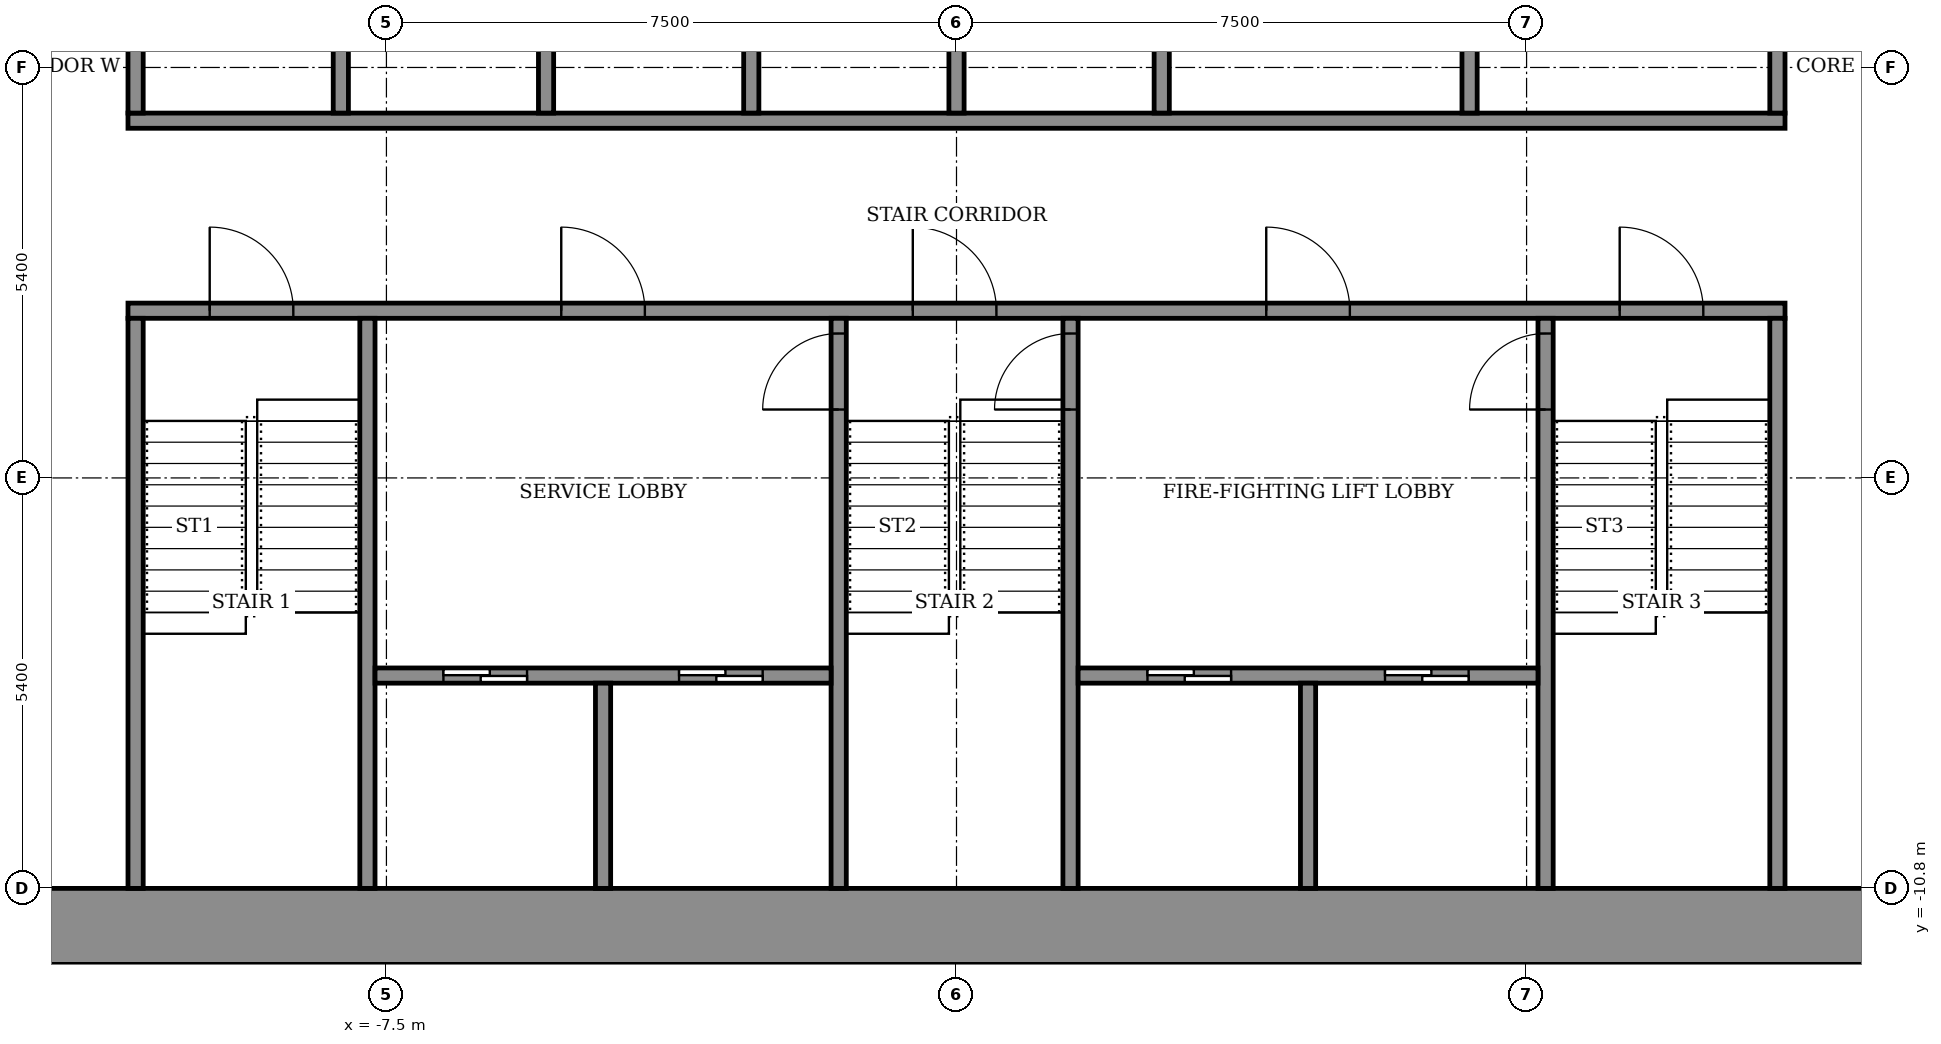
"""IFC4 building model, lengths in metres.
Left out: names, types, materials, properties, quantities, classifications, styles, units other than length and angle.
Written with IfcOpenShell. Run it as: python <this file> out.ifc"""

import sys

from ifc_helpers import new_model, si_unit, direction, frame, frame_2d, origin, place, context, subcontext, project, spatial, rectangle, extrude, element, fill, save


model = new_model("IFC4")
c1 = context("Model", 3, precision=1e-05, world=origin(), true_north=direction((0.0, 1.0)))
c2 = subcontext(c1, "Body", "Model", "MODEL_VIEW")
j1 = project(units=[si_unit("LENGTHUNIT", "METRE"), si_unit("PLANEANGLEUNIT", "RADIAN")], contexts=[c1])
p1 = place(None, origin())
s1 = spatial("IfcSite", under=j1, at=p1, CompositionType="ELEMENT")
p2 = place(p1, origin())
s2 = spatial("IfcBuilding", under=s1, at=p2, CompositionType="ELEMENT")
p3 = place(p2, frame((0.0, 0.0, 93.7)))
s3 = spatial("IfcBuildingStorey", under=s2, at=p3, CompositionType="ELEMENT", Elevation=93.7)
p4 = place(p3, frame((-14.8, -11.3, 0.0), z_axis=(0.0, 0.0, 1.0), x_axis=(1.0, 0.0, 0.0)))
e1 = element("IfcWall", 1, at=p4, inside=s3, PredefinedType="SHEAR", context=c2, shape_type="SweptSolid", body=[
    extrude(rectangle(XDim=29.6, YDim=1.0, at=frame_2d((14.8, 0.0))), origin(), (0.0, 0.0, 1.0), 3.6),
])
p5 = place(p3, frame((-10.9, -3.2, 0.0), z_axis=(0.0, 0.0, 1.0), x_axis=(1.0, 0.0, 0.0)))
e2 = element("IfcWall", 2, at=p5, inside=s3, PredefinedType="SHEAR", context=c2, shape_type="SweptSolid", body=[
    extrude(rectangle(XDim=21.8, YDim=0.2, at=frame_2d((10.9, 0.0))), origin(), (0.0, 0.0, 1.0), 3.05),
])
p6 = place(p5, frame((1.075, 0.0, 0.0)))
e3 = element("IfcOpeningElement", 3, at=p6, cuts=e2, PredefinedType="OPENING", context=c2, shape_type="SweptSolid", body=[
    extrude(rectangle(XDim=1.1, YDim=2.1, at=frame_2d((0.55, 1.05))), frame((0.0, 0.11, 0.0), z_axis=(0.0, -1.0, 0.0), x_axis=(1.0, 0.0, 0.0)), (0.0, 0.0, 1.0), 0.22),
])
p7 = place(p5, frame((10.325, 0.0, 0.0)))
e4 = element("IfcOpeningElement", 4, at=p7, cuts=e2, PredefinedType="OPENING", context=c2, shape_type="SweptSolid", body=[
    extrude(rectangle(XDim=1.1, YDim=2.1, at=frame_2d((0.55, 1.05))), frame((0.0, 0.11, 0.0), z_axis=(0.0, -1.0, 0.0), x_axis=(1.0, 0.0, 0.0)), (0.0, 0.0, 1.0), 0.22),
])
p8 = place(p5, frame((19.625, 0.0, 0.0)))
e5 = element("IfcOpeningElement", 5, at=p8, cuts=e2, PredefinedType="OPENING", context=c2, shape_type="SweptSolid", body=[
    extrude(rectangle(XDim=1.1, YDim=2.1, at=frame_2d((0.55, 1.05))), frame((0.0, 0.11, 0.0), z_axis=(0.0, -1.0, 0.0), x_axis=(1.0, 0.0, 0.0)), (0.0, 0.0, 1.0), 0.22),
])
p9 = place(p5, frame((5.7, 0.0, 0.0)))
e6 = element("IfcOpeningElement", 6, at=p9, cuts=e2, PredefinedType="OPENING", context=c2, shape_type="SweptSolid", body=[
    extrude(rectangle(XDim=1.1, YDim=2.1, at=frame_2d((0.55, 1.05))), frame((0.0, 0.11, 0.0), z_axis=(0.0, -1.0, 0.0), x_axis=(1.0, 0.0, 0.0)), (0.0, 0.0, 1.0), 0.22),
])
p10 = place(p5, frame((14.975, 0.0, 0.0)))
e7 = element("IfcOpeningElement", 7, at=p10, cuts=e2, PredefinedType="OPENING", context=c2, shape_type="SweptSolid", body=[
    extrude(rectangle(XDim=1.1, YDim=2.1, at=frame_2d((0.55, 1.05))), frame((0.0, 0.11, 0.0), z_axis=(0.0, -1.0, 0.0), x_axis=(1.0, 0.0, 0.0)), (0.0, 0.0, 1.0), 0.22),
])
p11 = place(p3, frame((-10.9, -0.7, 0.0), z_axis=(0.0, 0.0, 1.0), x_axis=(1.0, 0.0, 0.0)))
e8 = element("IfcWall", 8, at=p11, inside=s3, PredefinedType="SHEAR", context=c2, shape_type="SweptSolid", body=[
    extrude(rectangle(XDim=21.8, YDim=0.2, at=frame_2d((10.9, 0.0))), origin(), (0.0, 0.0, 1.0), 3.05),
])
for number, where, z_axis, x_axis in (
    (9, (-10.8, -10.8, 0.0), (0.0, 0.0, 1.0), (0.0, 1.0, 0.0)),
    (10, (-7.75, -10.8, 0.0), (0.0, 0.0, 1.0), (0.0, 1.0, 0.0)),
):
    element("IfcWall", number, at=place(p3, frame(where, z_axis=z_axis, x_axis=x_axis)), inside=s3, PredefinedType="SHEAR", context=c2, shape_type="SweptSolid", body=[
        extrude(rectangle(XDim=7.5, YDim=0.2, at=frame_2d((3.75, 0.0))), origin(), (0.0, 0.0, 1.0), 3.05),
    ])
p12 = place(p3, frame((-1.55, -10.8, 0.0), z_axis=(0.0, 0.0, 1.0), x_axis=(0.0, 1.0, 0.0)))
e11 = element("IfcWall", 11, at=p12, inside=s3, PredefinedType="SHEAR", context=c2, shape_type="SweptSolid", body=[
    extrude(rectangle(XDim=7.5, YDim=0.2, at=frame_2d((3.75, 0.0))), origin(), (0.0, 0.0, 1.0), 3.05),
])
p13 = place(p12, frame((6.3, 0.0, 0.0)))
e12 = element("IfcOpeningElement", 12, at=p13, cuts=e11, PredefinedType="OPENING", context=c2, shape_type="SweptSolid", body=[
    extrude(rectangle(XDim=1.0, YDim=2.1, at=frame_2d((0.5, 1.05))), frame((0.0, 0.11, 0.0), z_axis=(0.0, -1.0, 0.0), x_axis=(1.0, 0.0, 0.0)), (0.0, 0.0, 1.0), 0.22),
])
p14 = place(p3, frame((1.5, -10.8, 0.0), z_axis=(0.0, 0.0, 1.0), x_axis=(0.0, 1.0, 0.0)))
e13 = element("IfcWall", 13, at=p14, inside=s3, PredefinedType="SHEAR", context=c2, shape_type="SweptSolid", body=[
    extrude(rectangle(XDim=7.5, YDim=0.2, at=frame_2d((3.75, 0.0))), origin(), (0.0, 0.0, 1.0), 3.05),
])
p15 = place(p14, frame((6.3, 0.0, 0.0)))
e14 = element("IfcOpeningElement", 14, at=p15, cuts=e13, PredefinedType="OPENING", context=c2, shape_type="SweptSolid", body=[
    extrude(rectangle(XDim=1.0, YDim=2.1, at=frame_2d((0.5, 1.05))), frame((0.0, 0.11, 0.0), z_axis=(0.0, -1.0, 0.0), x_axis=(1.0, 0.0, 0.0)), (0.0, 0.0, 1.0), 0.22),
])
p16 = place(p3, frame((7.75, -10.8, 0.0), z_axis=(0.0, 0.0, 1.0), x_axis=(0.0, 1.0, 0.0)))
e15 = element("IfcWall", 15, at=p16, inside=s3, PredefinedType="SHEAR", context=c2, shape_type="SweptSolid", body=[
    extrude(rectangle(XDim=7.5, YDim=0.2, at=frame_2d((3.75, 0.0))), origin(), (0.0, 0.0, 1.0), 3.05),
])
p17 = place(p16, frame((6.3, 0.0, 0.0)))
e16 = element("IfcOpeningElement", 16, at=p17, cuts=e15, PredefinedType="OPENING", context=c2, shape_type="SweptSolid", body=[
    extrude(rectangle(XDim=1.0, YDim=2.1, at=frame_2d((0.5, 1.05))), frame((0.0, 0.11, 0.0), z_axis=(0.0, -1.0, 0.0), x_axis=(1.0, 0.0, 0.0)), (0.0, 0.0, 1.0), 0.22),
])
p18 = place(p3, frame((10.8, -10.8, 0.0), z_axis=(0.0, 0.0, 1.0), x_axis=(0.0, 1.0, 0.0)))
e17 = element("IfcWall", 17, at=p18, inside=s3, PredefinedType="SHEAR", context=c2, shape_type="SweptSolid", body=[
    extrude(rectangle(XDim=7.5, YDim=0.2, at=frame_2d((3.75, 0.0))), origin(), (0.0, 0.0, 1.0), 3.05),
])
p19 = place(p3, frame((-7.65, -8.0, 0.0), z_axis=(0.0, 0.0, 1.0), x_axis=(1.0, 0.0, 0.0)))
e18 = element("IfcWall", 18, at=p19, inside=s3, PredefinedType="SHEAR", context=c2, shape_type="SweptSolid", body=[
    extrude(rectangle(XDim=6.0, YDim=0.2, at=frame_2d((3.0, 0.0))), origin(), (0.0, 0.0, 1.0), 3.05),
])
p20 = place(p19, frame((0.9, 0.0, 0.0)))
e19 = element("IfcOpeningElement", 19, at=p20, cuts=e18, PredefinedType="OPENING", context=c2, shape_type="SweptSolid", body=[
    extrude(rectangle(XDim=1.1, YDim=2.1, at=frame_2d((0.55, 1.05))), frame((0.0, 0.11, 0.0), z_axis=(0.0, -1.0, 0.0), x_axis=(1.0, 0.0, 0.0)), (0.0, 0.0, 1.0), 0.22),
])
p21 = place(p19, frame((4.0, 0.0, 0.0)))
e20 = element("IfcOpeningElement", 20, at=p21, cuts=e18, PredefinedType="OPENING", context=c2, shape_type="SweptSolid", body=[
    extrude(rectangle(XDim=1.1, YDim=2.1, at=frame_2d((0.55, 1.05))), frame((0.0, 0.11, 0.0), z_axis=(0.0, -1.0, 0.0), x_axis=(1.0, 0.0, 0.0)), (0.0, 0.0, 1.0), 0.22),
])
p22 = place(p3, frame((-4.65, -10.8, 0.0), z_axis=(0.0, 0.0, 1.0), x_axis=(0.0, 1.0, 0.0)))
e21 = element("IfcWall", 21, at=p22, inside=s3, PredefinedType="SHEAR", context=c2, shape_type="SweptSolid", body=[
    extrude(rectangle(XDim=2.7, YDim=0.2, at=frame_2d((1.35, 0.0))), origin(), (0.0, 0.0, 1.0), 3.05),
])
p23 = place(p3, frame((1.6, -8.0, 0.0), z_axis=(0.0, 0.0, 1.0), x_axis=(1.0, 0.0, 0.0)))
e22 = element("IfcWall", 22, at=p23, inside=s3, PredefinedType="SHEAR", context=c2, shape_type="SweptSolid", body=[
    extrude(rectangle(XDim=6.05, YDim=0.2, at=frame_2d((3.025, 0.0))), origin(), (0.0, 0.0, 1.0), 3.05),
])
p24 = place(p23, frame((0.913, 0.0, 0.0)))
e23 = element("IfcOpeningElement", 23, at=p24, cuts=e22, PredefinedType="OPENING", context=c2, shape_type="SweptSolid", body=[
    extrude(rectangle(XDim=1.1, YDim=2.1, at=frame_2d((0.55, 1.05))), frame((0.0, 0.11, 0.0), z_axis=(0.0, -1.0, 0.0), x_axis=(1.0, 0.0, 0.0)), (0.0, 0.0, 1.0), 0.22),
])
p25 = place(p23, frame((4.038, 0.0, 0.0)))
e24 = element("IfcOpeningElement", 24, at=p25, cuts=e22, PredefinedType="OPENING", context=c2, shape_type="SweptSolid", body=[
    extrude(rectangle(XDim=1.1, YDim=2.1, at=frame_2d((0.55, 1.05))), frame((0.0, 0.11, 0.0), z_axis=(0.0, -1.0, 0.0), x_axis=(1.0, 0.0, 0.0)), (0.0, 0.0, 1.0), 0.22),
])
p26 = place(p3, frame((4.625, -10.8, 0.0), z_axis=(0.0, 0.0, 1.0), x_axis=(0.0, 1.0, 0.0)))
e25 = element("IfcWall", 25, at=p26, inside=s3, PredefinedType="SHEAR", context=c2, shape_type="SweptSolid", body=[
    extrude(rectangle(XDim=2.7, YDim=0.2, at=frame_2d((1.35, 0.0))), origin(), (0.0, 0.0, 1.0), 3.05),
])
for number, where, z_axis, x_axis in (
    (26, (-10.8, -0.6, 0.0), (0.0, 0.0, 1.0), (0.0, 1.0, 0.0)),
    (27, (-8.1, -0.6, 0.0), (0.0, 0.0, 1.0), (0.0, 1.0, 0.0)),
    (28, (-5.4, -0.6, 0.0), (0.0, 0.0, 1.0), (0.0, 1.0, 0.0)),
    (29, (-2.7, -0.6, 0.0), (0.0, 0.0, 1.0), (0.0, 1.0, 0.0)),
    (30, (0.0, -0.6, 0.0), (0.0, 0.0, 1.0), (0.0, 1.0, 0.0)),
    (31, (2.7, -0.6, 0.0), (0.0, 0.0, 1.0), (0.0, 1.0, 0.0)),
):
    element("IfcWall", number, at=place(p3, frame(where, z_axis=z_axis, x_axis=x_axis)), inside=s3, PredefinedType="SHEAR", context=c2, shape_type="SweptSolid", body=[
        extrude(rectangle(XDim=2.5, YDim=0.2, at=frame_2d((1.25, 0.0))), origin(), (0.0, 0.0, 1.0), 3.05),
    ])
for number, where, z_axis, x_axis in (
    (32, (6.75, -0.6, 0.0), (0.0, 0.0, 1.0), (0.0, 1.0, 0.0)),
    (33, (10.8, -0.6, 0.0), (0.0, 0.0, 1.0), (0.0, 1.0, 0.0)),
):
    element("IfcWall", number, at=place(p3, frame(where, z_axis=z_axis, x_axis=x_axis)), inside=s3, PredefinedType="STANDARD", context=c2, shape_type="SweptSolid", body=[
        extrude(rectangle(XDim=2.5, YDim=0.2, at=frame_2d((1.25, 0.0))), origin(), (0.0, 0.0, 1.0), 3.05),
    ])
p27 = place(p24, origin())
e34 = element("IfcDoor", 34, at=p27, inside=s3, OperationType="SLIDING_TO_LEFT", PredefinedType="DOOR", context=c2, shape_type="SweptSolid", body=[
    extrude(rectangle(XDim=1.1, YDim=2.1, at=frame_2d((0.55, 1.05))), frame((0.0, 0.025, 0.0), z_axis=(0.0, -1.0, 0.0), x_axis=(1.0, 0.0, 0.0)), (0.0, 0.0, 1.0), 0.05),
])
fill(e23, e34)
p28 = place(p20, origin())
e35 = element("IfcDoor", 35, at=p28, inside=s3, OperationType="SLIDING_TO_LEFT", PredefinedType="DOOR", context=c2, shape_type="SweptSolid", body=[
    extrude(rectangle(XDim=1.1, YDim=2.1, at=frame_2d((0.55, 1.05))), frame((0.0, 0.025, 0.0), z_axis=(0.0, -1.0, 0.0), x_axis=(1.0, 0.0, 0.0)), (0.0, 0.0, 1.0), 0.05),
])
fill(e19, e35)
p29 = place(p25, origin())
e36 = element("IfcDoor", 36, at=p29, inside=s3, OperationType="SLIDING_TO_LEFT", PredefinedType="DOOR", context=c2, shape_type="SweptSolid", body=[
    extrude(rectangle(XDim=1.1, YDim=2.1, at=frame_2d((0.55, 1.05))), frame((0.0, 0.025, 0.0), z_axis=(0.0, -1.0, 0.0), x_axis=(1.0, 0.0, 0.0)), (0.0, 0.0, 1.0), 0.05),
])
fill(e24, e36)
p30 = place(p21, origin())
e37 = element("IfcDoor", 37, at=p30, inside=s3, OperationType="SLIDING_TO_LEFT", PredefinedType="DOOR", context=c2, shape_type="SweptSolid", body=[
    extrude(rectangle(XDim=1.1, YDim=2.1, at=frame_2d((0.55, 1.05))), frame((0.0, 0.025, 0.0), z_axis=(0.0, -1.0, 0.0), x_axis=(1.0, 0.0, 0.0)), (0.0, 0.0, 1.0), 0.05),
])
fill(e20, e37)
p31 = place(p6, origin())
e38 = element("IfcDoor", 38, at=p31, inside=s3, OperationType="SINGLE_SWING_RIGHT", PredefinedType="DOOR", context=c2, shape_type="SweptSolid", body=[
    extrude(rectangle(XDim=1.1, YDim=2.1, at=frame_2d((0.55, 1.05))), frame((0.0, 0.025, 0.0), z_axis=(0.0, -1.0, 0.0), x_axis=(1.0, 0.0, 0.0)), (0.0, 0.0, 1.0), 0.05),
])
fill(e3, e38)
p32 = place(p7, origin())
e39 = element("IfcDoor", 39, at=p32, inside=s3, OperationType="SINGLE_SWING_RIGHT", PredefinedType="DOOR", context=c2, shape_type="SweptSolid", body=[
    extrude(rectangle(XDim=1.1, YDim=2.1, at=frame_2d((0.55, 1.05))), frame((0.0, 0.025, 0.0), z_axis=(0.0, -1.0, 0.0), x_axis=(1.0, 0.0, 0.0)), (0.0, 0.0, 1.0), 0.05),
])
fill(e4, e39)
p33 = place(p8, origin())
e40 = element("IfcDoor", 40, at=p33, inside=s3, OperationType="SINGLE_SWING_RIGHT", PredefinedType="DOOR", context=c2, shape_type="SweptSolid", body=[
    extrude(rectangle(XDim=1.1, YDim=2.1, at=frame_2d((0.55, 1.05))), frame((0.0, 0.025, 0.0), z_axis=(0.0, -1.0, 0.0), x_axis=(1.0, 0.0, 0.0)), (0.0, 0.0, 1.0), 0.05),
])
fill(e5, e40)
p34 = place(p9, origin())
e41 = element("IfcDoor", 41, at=p34, inside=s3, OperationType="SINGLE_SWING_LEFT", PredefinedType="DOOR", context=c2, shape_type="SweptSolid", body=[
    extrude(rectangle(XDim=1.1, YDim=2.1, at=frame_2d((0.55, 1.05))), frame((0.0, 0.025, 0.0), z_axis=(0.0, -1.0, 0.0), x_axis=(1.0, 0.0, 0.0)), (0.0, 0.0, 1.0), 0.05),
])
fill(e6, e41)
p35 = place(p10, origin())
e42 = element("IfcDoor", 42, at=p35, inside=s3, OperationType="SINGLE_SWING_LEFT", PredefinedType="DOOR", context=c2, shape_type="SweptSolid", body=[
    extrude(rectangle(XDim=1.1, YDim=2.1, at=frame_2d((0.55, 1.05))), frame((0.0, 0.025, 0.0), z_axis=(0.0, -1.0, 0.0), x_axis=(1.0, 0.0, 0.0)), (0.0, 0.0, 1.0), 0.05),
])
fill(e7, e42)
p36 = place(p13, origin())
e43 = element("IfcDoor", 43, at=p36, inside=s3, OperationType="SINGLE_SWING_RIGHT", PredefinedType="DOOR", context=c2, shape_type="SweptSolid", body=[
    extrude(rectangle(XDim=1.0, YDim=2.1, at=frame_2d((0.5, 1.05))), frame((0.0, 0.025, 0.0), z_axis=(0.0, -1.0, 0.0), x_axis=(1.0, 0.0, 0.0)), (0.0, 0.0, 1.0), 0.05),
])
fill(e12, e43)
p37 = place(p15, origin())
e44 = element("IfcDoor", 44, at=p37, inside=s3, OperationType="SINGLE_SWING_RIGHT", PredefinedType="DOOR", context=c2, shape_type="SweptSolid", body=[
    extrude(rectangle(XDim=1.0, YDim=2.1, at=frame_2d((0.5, 1.05))), frame((0.0, 0.025, 0.0), z_axis=(0.0, -1.0, 0.0), x_axis=(1.0, 0.0, 0.0)), (0.0, 0.0, 1.0), 0.05),
])
fill(e14, e44)
p38 = place(p17, origin())
e45 = element("IfcDoor", 45, at=p38, inside=s3, OperationType="SINGLE_SWING_RIGHT", PredefinedType="DOOR", context=c2, shape_type="SweptSolid", body=[
    extrude(rectangle(XDim=1.0, YDim=2.1, at=frame_2d((0.5, 1.05))), frame((0.0, 0.025, 0.0), z_axis=(0.0, -1.0, 0.0), x_axis=(1.0, 0.0, 0.0)), (0.0, 0.0, 1.0), 0.05),
])
fill(e16, e45)
save(model, sys.argv[1])
